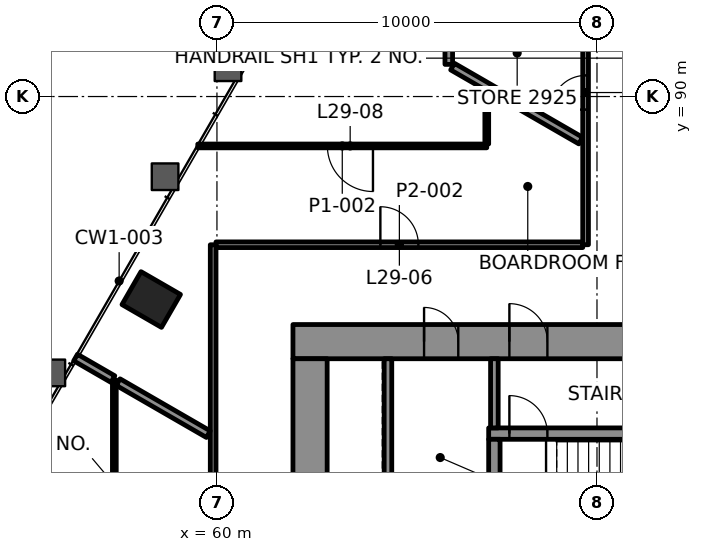
"""IFC4 building model, lengths in metres.
Left out: names, types, materials, properties, quantities, classifications, styles, units other than length and angle.
Written with IfcOpenShell. Run it as: python <this file> out.ifc"""

import sys

from ifc_helpers import new_model, si_unit, direction, frame, frame_2d, origin, origin_2d, place, context, subcontext, project, spatial, rectangle, extrude, element, fill, save


model = new_model("IFC4")
c1 = context("Model", 3, precision=1e-05, world=origin(), true_north=direction((0.0, 1.0)))
c2 = subcontext(c1, "Body", "Model", "MODEL_VIEW")
j1 = project(units=[si_unit("LENGTHUNIT", "METRE"), si_unit("PLANEANGLEUNIT", "RADIAN")], contexts=[c1])
p1 = place(None, origin())
s1 = spatial("IfcSite", under=j1, at=p1, CompositionType="ELEMENT")
p2 = place(p1, origin())
s2 = spatial("IfcBuilding", under=s1, at=p2, CompositionType="ELEMENT")
p3 = place(p2, frame((0.0, 0.0, 128.2)))
s3 = spatial("IfcBuildingStorey", under=s2, at=p3, CompositionType="ELEMENT", Elevation=128.2)
p4 = place(p3, frame((58.271, 84.658, -0.0), z_axis=(0.0, 0.0, 1.0), x_axis=(-0.5, -0.866025403784, 0.0)))
e1 = element("IfcColumn", 1, at=p4, inside=s3, PredefinedType="COLUMN", context=c2, shape_type="SweptSolid", body=[
    extrude(rectangle(XDim=1.0, YDim=1.2, at=origin_2d()), origin(), (0.0, 0.0, 1.0), 4.2),
])
p5 = place(p3, frame((62.0, 83.55, 0.0), z_axis=(0.0, 0.0, 1.0), x_axis=(1.0, 0.0, 0.0)))
e2 = element("IfcWall", 2, at=p5, inside=s3, PredefinedType="SHEAR", context=c2, shape_type="SweptSolid", body=[
    extrude(rectangle(XDim=26.0, YDim=0.9, at=frame_2d((13.0, 0.0))), origin(), (0.0, 0.0, 1.0), 4.0),
])
p6 = place(p5, frame((5.695, 0.0, 0.0)))
e3 = element("IfcOpeningElement", 3, at=p6, cuts=e2, PredefinedType="OPENING", context=c2, shape_type="SweptSolid", body=[
    extrude(rectangle(XDim=1.0, YDim=2.1, at=frame_2d((0.5, 1.05))), frame((0.0, 0.46, 0.0), z_axis=(0.0, -1.0, 0.0), x_axis=(1.0, 0.0, 0.0)), (0.0, 0.0, 1.0), 0.92),
])
p7 = place(p5, frame((19.505, 0.0, 0.0)))
e4 = element("IfcOpeningElement", 4, at=p7, cuts=e2, PredefinedType="OPENING", context=c2, shape_type="SweptSolid", body=[
    extrude(rectangle(XDim=1.0, YDim=2.1, at=frame_2d((0.5, 1.05))), frame((0.0, 0.46, 0.0), z_axis=(0.0, -1.0, 0.0), x_axis=(1.0, 0.0, 0.0)), (0.0, 0.0, 1.0), 0.92),
])
p8 = place(p5, frame((3.45, 0.0, 0.0)))
e5 = element("IfcOpeningElement", 5, at=p8, cuts=e2, PredefinedType="OPENING", context=c2, shape_type="SweptSolid", body=[
    extrude(rectangle(XDim=0.9, YDim=2.1, at=frame_2d((0.45, 1.05))), frame((0.0, 0.46, 0.0), z_axis=(0.0, -1.0, 0.0), x_axis=(1.0, 0.0, 0.0)), (0.0, 0.0, 1.0), 0.92),
])
p9 = place(p5, frame((12.65, 0.0, 0.0)))
e6 = element("IfcOpeningElement", 6, at=p9, cuts=e2, PredefinedType="OPENING", context=c2, shape_type="SweptSolid", body=[
    extrude(rectangle(XDim=0.9, YDim=2.1, at=frame_2d((0.45, 1.05))), frame((0.0, 0.46, 0.0), z_axis=(0.0, -1.0, 0.0), x_axis=(1.0, 0.0, 0.0)), (0.0, 0.0, 1.0), 0.92),
])
p10 = place(p5, frame((22.55, 0.0, 0.0)))
e7 = element("IfcOpeningElement", 7, at=p10, cuts=e2, PredefinedType="OPENING", context=c2, shape_type="SweptSolid", body=[
    extrude(rectangle(XDim=0.9, YDim=2.1, at=frame_2d((0.45, 1.05))), frame((0.0, 0.46, 0.0), z_axis=(0.0, -1.0, 0.0), x_axis=(1.0, 0.0, 0.0)), (0.0, 0.0, 1.0), 0.92),
])
p11 = place(p3, frame((62.45, 66.9, 0.0), z_axis=(0.0, 0.0, 1.0), x_axis=(0.0, 1.0, 0.0)))
e8 = element("IfcWall", 8, at=p11, inside=s3, PredefinedType="SHEAR", context=c2, shape_type="SweptSolid", body=[
    extrude(rectangle(XDim=16.2, YDim=0.9, at=frame_2d((8.1, 0.0))), origin(), (0.0, 0.0, 1.0), 4.0),
])
p12 = place(p11, frame((5.5, 0.0, 0.0)))
e9 = element("IfcOpeningElement", 9, at=p12, cuts=e8, PredefinedType="OPENING", context=c2, shape_type="SweptSolid", body=[
    extrude(rectangle(XDim=1.8, YDim=2.1, at=frame_2d((0.9, 1.05))), frame((0.0, 0.46, 0.0), z_axis=(0.0, -1.0, 0.0), x_axis=(1.0, 0.0, 0.0)), (0.0, 0.0, 1.0), 0.92),
])
p13 = place(p3, frame((67.15, 81.13, 0.0), z_axis=(0.0, 0.0, 1.0), x_axis=(1.0, 0.0, 0.0)))
e10 = element("IfcWall", 10, at=p13, inside=s3, PredefinedType="SHEAR", context=c2, shape_type="SweptSolid", body=[
    extrude(rectangle(XDim=6.91, YDim=0.3, at=frame_2d((3.455, 0.0))), origin(), (0.0, 0.0, 1.0), 4.0),
])
p14 = place(p13, frame((0.545, 0.0, 0.0)))
e11 = element("IfcOpeningElement", 11, at=p14, cuts=e10, PredefinedType="OPENING", context=c2, shape_type="SweptSolid", body=[
    extrude(rectangle(XDim=1.0, YDim=2.1, at=frame_2d((0.5, 1.05))), frame((0.0, 0.16, 0.0), z_axis=(0.0, -1.0, 0.0), x_axis=(1.0, 0.0, 0.0)), (0.0, 0.0, 1.0), 0.32),
])
p15 = place(p3, frame((67.3, 77.9, 0.0), z_axis=(0.0, 0.0, 1.0), x_axis=(0.0, 1.0, 0.0)))
e12 = element("IfcWall", 12, at=p15, inside=s3, PredefinedType="SHEAR", context=c2, shape_type="SweptSolid", body=[
    extrude(rectangle(XDim=3.08, YDim=0.3, at=frame_2d((1.54, 0.0))), origin(), (0.0, 0.0, 1.0), 4.0),
])
p16 = place(p3, frame((59.976, 86.1, 0.0), z_axis=(0.0, 0.0, 1.0), x_axis=(1.0, 0.0, 0.0)))
e13 = element("IfcWall", 13, at=p16, inside=s3, PredefinedType="PARTITIONING", context=c2, shape_type="SweptSolid", body=[
    extrude(rectangle(XDim=9.649, YDim=0.15, at=frame_2d((4.825, 0.0))), origin(), (0.0, 0.0, 1.0), 3.4),
])
p17 = place(p16, frame((4.325, 0.0, 0.0)))
e14 = element("IfcOpeningElement", 14, at=p17, cuts=e13, PredefinedType="OPENING", context=c2, shape_type="SweptSolid", body=[
    extrude(rectangle(XDim=1.0, YDim=2.1, at=frame_2d((0.5, 1.05))), frame((0.0, 0.085, 0.0), z_axis=(0.0, -1.0, 0.0), x_axis=(1.0, 0.0, 0.0)), (0.0, 0.0, 1.0), 0.17),
])
p18 = place(p3, frame((67.1, 88.7, 0.0), z_axis=(0.0, 0.0, 1.0), x_axis=(-1.0, 0.0, 0.0)))
e15 = element("IfcWall", 15, at=p18, inside=s3, PredefinedType="PARTITIONING", context=c2, shape_type="SweptSolid", body=[
    extrude(rectangle(XDim=7.604, YDim=0.1, at=frame_2d((3.802, 0.0))), origin(), (0.0, 0.0, 1.0), 3.165),
])
p19 = place(p18, frame((2.994, 0.0, 0.0)))
e16 = element("IfcOpeningElement", 16, at=p19, cuts=e15, PredefinedType="OPENING", context=c2, shape_type="SweptSolid", body=[
    extrude(rectangle(XDim=1.2, YDim=2.1, at=frame_2d((0.6, 1.05))), frame((0.0, 0.06, 0.0), z_axis=(0.0, -1.0, 0.0), x_axis=(1.0, 0.0, 0.0)), (0.0, 0.0, 1.0), 0.12),
])
p20 = place(p3, frame((69.7, 86.1, 0.0), z_axis=(0.0, 0.0, 1.0), x_axis=(0.0, 1.0, 0.0)))
e17 = element("IfcWall", 17, at=p20, inside=s3, PredefinedType="PARTITIONING", context=c2, shape_type="SweptSolid", body=[
    extrude(rectangle(XDim=10.6, YDim=0.15, at=frame_2d((5.3, 0.0))), origin(), (0.0, 0.0, 1.0), 3.322),
])
p21 = place(p20, frame((3.555, 0.0, 0.0)))
e18 = element("IfcOpeningElement", 18, at=p21, cuts=e17, PredefinedType="OPENING", context=c2, shape_type="SweptSolid", body=[
    extrude(rectangle(XDim=0.9, YDim=2.1, at=frame_2d((0.45, 1.05))), frame((0.0, 0.085, 0.0), z_axis=(0.0, -1.0, 0.0), x_axis=(1.0, 0.0, 0.0)), (0.0, 0.0, 1.0), 0.17),
])
p22 = place(p20, frame((6.232, 0.0, 0.0)))
e19 = element("IfcOpeningElement", 19, at=p22, cuts=e17, PredefinedType="OPENING", context=c2, shape_type="SweptSolid", body=[
    extrude(rectangle(XDim=0.9, YDim=2.1, at=frame_2d((0.45, 1.05))), frame((0.0, 0.085, 0.0), z_axis=(0.0, -1.0, 0.0), x_axis=(1.0, 0.0, 0.0)), (0.0, 0.0, 1.0), 0.17),
])
p23 = place(p20, frame((8.759, 0.0, 0.0)))
e20 = element("IfcOpeningElement", 20, at=p23, cuts=e17, PredefinedType="OPENING", context=c2, shape_type="SweptSolid", body=[
    extrude(rectangle(XDim=0.9, YDim=2.1, at=frame_2d((0.45, 1.05))), frame((0.0, 0.085, 0.0), z_axis=(0.0, -1.0, 0.0), x_axis=(1.0, 0.0, 0.0)), (0.0, 0.0, 1.0), 0.17),
])
p24 = place(p3, frame((67.1, 88.75, 0.0), z_axis=(0.0, 0.0, 1.0), x_axis=(0.0, 1.0, 0.0)))
e21 = element("IfcWall", 21, at=p24, inside=s3, PredefinedType="PARTITIONING", context=c2, shape_type="SweptSolid", body=[
    extrude(rectangle(XDim=1.372, YDim=0.1, at=frame_2d((0.686, 0.0))), origin(), (0.0, 0.0, 1.0), 3.322),
])
p25 = place(p3, frame((66.1, 90.846, 0.0), z_axis=(0.0, 0.0, 1.0), x_axis=(0.0, 1.0, 0.0)))
e22 = element("IfcWall", 22, at=p25, inside=s3, PredefinedType="PARTITIONING", context=c2, shape_type="SweptSolid", body=[
    extrude(rectangle(XDim=8.029, YDim=0.2, at=frame_2d((4.014, 0.0))), origin(), (0.0, 0.0, 1.0), 3.165),
])
p26 = place(p3, frame((59.9, 67.321, 0.0), z_axis=(0.0, 0.0, 1.0), x_axis=(0.0, 1.0, 0.0)))
e23 = element("IfcWall", 23, at=p26, inside=s3, PredefinedType="PARTITIONING", context=c2, shape_type="SweptSolid", body=[
    extrude(rectangle(XDim=18.778, YDim=0.15, at=frame_2d((9.389, 0.0))), origin(), (0.0, 0.0, 1.0), 3.4),
])
p27 = place(p3, frame((57.3, 82.542, 0.0), z_axis=(0.0, 0.0, 1.0), x_axis=(0.0, -1.0, 0.0)))
e24 = element("IfcWall", 24, at=p27, inside=s3, PredefinedType="PARTITIONING", context=c2, shape_type="SweptSolid", body=[
    extrude(rectangle(XDim=13.72, YDim=0.1, at=frame_2d((6.86, 0.0))), origin(), (0.0, 0.0, 1.0), 3.4),
])
p28 = place(p27, frame((6.36, 0.0, 0.0)))
e25 = element("IfcOpeningElement", 25, at=p28, cuts=e24, PredefinedType="OPENING", context=c2, shape_type="SweptSolid", body=[
    extrude(rectangle(XDim=1.0, YDim=2.1, at=frame_2d((0.5, 1.05))), frame((0.0, 0.06, 0.0), z_axis=(0.0, -1.0, 0.0), x_axis=(1.0, 0.0, 0.0)), (0.0, 0.0, 1.0), 0.12),
])
p29 = place(p3, frame((69.573, 88.84, 0.0), z_axis=(0.0, 0.0, 1.0), x_axis=(-0.866043624834, 0.499968438888, 0.0)))
e26 = element("IfcWall", 26, at=p29, inside=s3, PredefinedType="PARTITIONING", context=c2, shape_type="SweptSolid", body=[
    extrude(rectangle(XDim=3.895, YDim=0.2, at=frame_2d((1.947, 0.0))), origin(), (0.0, 0.0, 1.0), 3.322),
])
p30 = place(p3, frame((59.773, 81.115, 0.0), z_axis=(0.0, 0.0, 1.0), x_axis=(-0.86604168154, 0.499971805041, 0.0)))
e27 = element("IfcWall", 27, at=p30, inside=s3, PredefinedType="PARTITIONING", context=c2, shape_type="SweptSolid", body=[
    extrude(rectangle(XDim=2.74, YDim=0.2, at=frame_2d((1.37, 0.0))), origin(), (0.0, 0.0, 1.0), 3.4),
])
p31 = place(p3, frame((57.263, 82.564, 0.0), z_axis=(0.0, 0.0, 1.0), x_axis=(-0.8660349869, 0.499983401189, 0.0)))
e28 = element("IfcWall", 28, at=p31, inside=s3, PredefinedType="PARTITIONING", context=c2, shape_type="SweptSolid", body=[
    extrude(rectangle(XDim=1.134, YDim=0.2, at=frame_2d((0.567, 0.0))), origin(), (0.0, 0.0, 1.0), 3.165),
])
p32 = place(p3, frame((64.5, 77.9, 0.0), z_axis=(0.0, 0.0, 1.0), x_axis=(0.0, 1.0, 0.0)))
e29 = element("IfcWall", 29, at=p32, inside=s3, PredefinedType="PARTITIONING", context=c2, shape_type="SweptSolid", body=[
    extrude(rectangle(XDim=5.2, YDim=0.2, at=frame_2d((2.6, 0.0))), origin(), (0.0, 0.0, 1.0), 4.0),
])
p33 = place(p3, frame((67.3, 81.28, 0.0), z_axis=(0.0, 0.0, 1.0), x_axis=(0.0, 1.0, 0.0)))
e30 = element("IfcWall", 30, at=p33, inside=s3, PredefinedType="PARTITIONING", context=c2, shape_type="SweptSolid", body=[
    extrude(rectangle(XDim=1.82, YDim=0.2, at=frame_2d((0.91, 0.0))), origin(), (0.0, 0.0, 1.0), 4.0),
])
p34 = place(p17, origin())
e31 = element("IfcDoor", 31, at=p34, inside=s3, OperationType="SINGLE_SWING_RIGHT", PredefinedType="DOOR", context=c2, shape_type="SweptSolid", body=[
    extrude(rectangle(XDim=1.0, YDim=2.1, at=frame_2d((0.5, 1.05))), frame((0.0, 0.025, 0.0), z_axis=(0.0, -1.0, 0.0), x_axis=(1.0, 0.0, 0.0)), (0.0, 0.0, 1.0), 0.05),
])
fill(e14, e31)
p35 = place(p19, origin())
e32 = element("IfcDoor", 32, at=p35, inside=s3, OperationType="DOUBLE_DOOR_SINGLE_SWING", PredefinedType="DOOR", context=c2, shape_type="SweptSolid", body=[
    extrude(rectangle(XDim=1.2, YDim=2.1, at=frame_2d((0.6, 1.05))), frame((0.0, 0.025, 0.0), z_axis=(0.0, -1.0, 0.0), x_axis=(1.0, 0.0, 0.0)), (0.0, 0.0, 1.0), 0.05),
])
fill(e16, e32)
p36 = place(p21, origin())
e33 = element("IfcDoor", 33, at=p36, inside=s3, OperationType="SINGLE_SWING_RIGHT", PredefinedType="DOOR", context=c2, shape_type="SweptSolid", body=[
    extrude(rectangle(XDim=0.9, YDim=2.1, at=frame_2d((0.45, 1.05))), frame((0.0, 0.025, 0.0), z_axis=(0.0, -1.0, 0.0), x_axis=(1.0, 0.0, 0.0)), (0.0, 0.0, 1.0), 0.05),
])
fill(e18, e33)
p37 = place(p14, origin())
e34 = element("IfcDoor", 34, at=p37, inside=s3, OperationType="SINGLE_SWING_RIGHT", PredefinedType="DOOR", context=c2, shape_type="SweptSolid", body=[
    extrude(rectangle(XDim=1.0, YDim=2.1, at=frame_2d((0.5, 1.05))), frame((0.0, 0.025, 0.0), z_axis=(0.0, -1.0, 0.0), x_axis=(1.0, 0.0, 0.0)), (0.0, 0.0, 1.0), 0.05),
])
fill(e11, e34)
p38 = place(p6, origin())
e35 = element("IfcDoor", 35, at=p38, inside=s3, OperationType="SINGLE_SWING_LEFT", PredefinedType="DOOR", context=c2, shape_type="SweptSolid", body=[
    extrude(rectangle(XDim=1.0, YDim=2.1, at=frame_2d((0.5, 1.05))), frame((0.0, 0.17, 0.0), z_axis=(0.0, -1.0, 0.0), x_axis=(1.0, 0.0, 0.0)), (0.0, 0.0, 1.0), 0.34),
])
fill(e3, e35)
p39 = place(p8, origin())
e36 = element("IfcDoor", 36, at=p39, inside=s3, OperationType="SINGLE_SWING_RIGHT", PredefinedType="DOOR", context=c2, shape_type="SweptSolid", body=[
    extrude(rectangle(XDim=0.9, YDim=2.1, at=frame_2d((0.45, 1.05))), frame((0.0, 0.17, 0.0), z_axis=(0.0, -1.0, 0.0), x_axis=(1.0, 0.0, 0.0)), (0.0, 0.0, 1.0), 0.34),
])
fill(e5, e36)
save(model, sys.argv[1])
